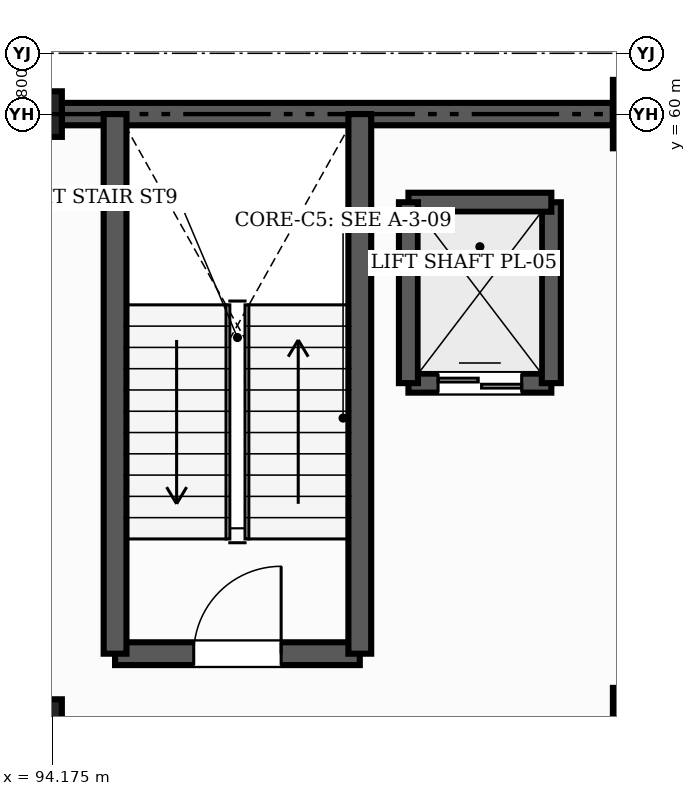
"""IFC4 building model, lengths in metres.
Left out: names, types, materials, properties, quantities, classifications, styles, units other than length and angle.
Written with IfcOpenShell. Run it as: python <this file> out.ifc"""

import sys

from ifc_helpers import new_model, si_unit, direction, frame, frame_2d, origin, origin_2d, place, context, subcontext, project, spatial, rectangle, extrude, element, fill, save


model = new_model("IFC4")
c1 = context("Model", 3, precision=1e-05, world=origin(), true_north=direction((0.0, 1.0)))
c2 = subcontext(c1, "Body", "Model", "MODEL_VIEW")
j1 = project(units=[si_unit("LENGTHUNIT", "METRE"), si_unit("PLANEANGLEUNIT", "RADIAN")], contexts=[c1])
p1 = place(None, origin())
s1 = spatial("IfcSite", under=j1, at=p1, CompositionType="ELEMENT")
p2 = place(p1, origin())
s2 = spatial("IfcBuilding", under=s1, at=p2, CompositionType="ELEMENT")
p3 = place(p2, frame((0.0, 0.0, 4.8)))
s3 = spatial("IfcBuildingStorey", under=s2, at=p3, CompositionType="ELEMENT", Elevation=4.8)
for number, where, z_axis, x_axis in (
    (1, (94.0, 52.0, 0.0), (0.0, 0.0, 1.0), (1.0, 0.0, 0.0)),
    (2, (94.0, 60.0, 0.0), (0.0, 0.0, 1.0), (1.0, 0.0, 0.0)),
):
    element("IfcColumn", number, at=place(p3, frame(where, z_axis=z_axis, x_axis=x_axis)), inside=s3, PredefinedType="COLUMN", context=c2, shape_type="SweptSolid", body=[
        extrude(rectangle(XDim=0.6, YDim=0.6, at=origin_2d()), origin(), (0.0, 0.0, 1.0), 4.2),
    ])
for number, where, z_axis, x_axis in (
    (3, (102.0, 52.0, 0.0), (0.0, 0.0, 1.0), (1.0, 0.0, 0.0)),
    (4, (102.0, 60.0, 0.0), (0.0, 0.0, 1.0), (1.0, 0.0, 0.0)),
):
    element("IfcColumn", number, at=place(p3, frame(where, z_axis=z_axis, x_axis=x_axis)), inside=s3, PredefinedType="COLUMN", context=c2, shape_type="SweptSolid", body=[
        extrude(rectangle(XDim=0.9, YDim=0.9, at=origin_2d()), origin(), (0.0, 0.0, 1.0), 4.2),
    ])
p4 = place(p3, frame((101.55, 60.0, 0.0), z_axis=(0.0, 0.0, 1.0), x_axis=(-1.0, 0.0, 0.0)))
e5 = element("IfcWall", 5, at=p4, inside=s3, PredefinedType="SOLIDWALL", context=c2, shape_type="SweptSolid", body=[
    extrude(rectangle(XDim=7.25, YDim=0.295, at=frame_2d((3.625, 0.0))), origin(), (0.0, 0.0, 1.0), 3.91),
])
p5 = place(p3, frame((95.0, 52.9, 0.0), z_axis=(0.0, 0.0, 1.0), x_axis=(1.0, 0.0, 0.0)))
e6 = element("IfcWall", 6, at=p5, inside=s3, PredefinedType="SHEAR", context=c2, shape_type="SweptSolid", body=[
    extrude(rectangle(XDim=3.22, YDim=0.3, at=frame_2d((1.61, 0.0))), origin(), (0.0, 0.0, 1.0), 4.2),
])
p6 = place(p5, frame((1.035, 0.0, 0.0)))
e7 = element("IfcOpeningElement", 7, at=p6, cuts=e6, PredefinedType="OPENING", context=c2, shape_type="SweptSolid", body=[
    extrude(rectangle(XDim=1.15, YDim=2.15, at=frame_2d((0.575, 1.075))), frame((0.0, 0.16, 0.0), z_axis=(0.0, -1.0, 0.0), x_axis=(1.0, 0.0, 0.0)), (0.0, 0.0, 1.0), 0.32),
])
for number, where, z_axis, x_axis in (
    (8, (98.22, 52.9, 0.0), (0.0, 0.0, 1.0), (0.0, 1.0, 0.0)),
    (9, (95.0, 60.0, 0.0), (0.0, 0.0, 1.0), (0.0, -1.0, 0.0)),
):
    element("IfcWall", number, at=place(p3, frame(where, z_axis=z_axis, x_axis=x_axis)), inside=s3, PredefinedType="SHEAR", context=c2, shape_type="SweptSolid", body=[
        extrude(rectangle(XDim=7.1, YDim=0.3, at=frame_2d((3.55, 0.0))), origin(), (0.0, 0.0, 1.0), 4.2),
    ])
p7 = place(p3, frame((98.86, 56.46, 0.0), z_axis=(0.0, 0.0, 1.0), x_axis=(1.0, 0.0, 0.0)))
e10 = element("IfcWall", 10, at=p7, inside=s3, PredefinedType="SHEAR", context=c2, shape_type="SweptSolid", body=[
    extrude(rectangle(XDim=1.88, YDim=0.25, at=frame_2d((0.94, 0.0))), origin(), (0.0, 0.0, 1.0), 4.2),
])
p8 = place(p7, frame((0.39, 0.0, 0.0)))
e11 = element("IfcOpeningElement", 11, at=p8, cuts=e10, PredefinedType="OPENING", context=c2, shape_type="SweptSolid", body=[
    extrude(rectangle(XDim=1.1, YDim=2.2, at=frame_2d((0.55, 1.1))), frame((0.0, 0.135, 0.0), z_axis=(0.0, -1.0, 0.0), x_axis=(1.0, 0.0, 0.0)), (0.0, 0.0, 1.0), 0.27),
])
p9 = place(p3, frame((100.74, 56.46, 0.0), z_axis=(0.0, 0.0, 1.0), x_axis=(0.0, 1.0, 0.0)))
e12 = element("IfcWall", 12, at=p9, inside=s3, PredefinedType="SHEAR", context=c2, shape_type="SweptSolid", body=[
    extrude(rectangle(XDim=2.38, YDim=0.25, at=frame_2d((1.19, 0.0))), origin(), (0.0, 0.0, 1.0), 4.2),
])
p10 = place(p3, frame((100.74, 58.84, 0.0), z_axis=(0.0, 0.0, 1.0), x_axis=(-1.0, 0.0, 0.0)))
e13 = element("IfcWall", 13, at=p10, inside=s3, PredefinedType="SHEAR", context=c2, shape_type="SweptSolid", body=[
    extrude(rectangle(XDim=1.88, YDim=0.25, at=frame_2d((0.94, 0.0))), origin(), (0.0, 0.0, 1.0), 4.2),
])
p11 = place(p3, frame((98.86, 58.84, 0.0), z_axis=(0.0, 0.0, 1.0), x_axis=(0.0, -1.0, 0.0)))
e14 = element("IfcWall", 14, at=p11, inside=s3, PredefinedType="SHEAR", context=c2, shape_type="SweptSolid", body=[
    extrude(rectangle(XDim=2.38, YDim=0.25, at=frame_2d((1.19, 0.0))), origin(), (0.0, 0.0, 1.0), 4.2),
])
p12 = place(p6, origin())
e15 = element("IfcDoor", 15, at=p12, inside=s3, OperationType="SINGLE_SWING_RIGHT", PredefinedType="DOOR", context=c2, shape_type="SweptSolid", body=[
    extrude(rectangle(XDim=1.15, YDim=2.15, at=frame_2d((0.575, 1.075))), frame((0.0, 0.025, 0.0), z_axis=(0.0, -1.0, 0.0), x_axis=(1.0, 0.0, 0.0)), (0.0, 0.0, 1.0), 0.05),
])
fill(e7, e15)
p13 = place(p8, origin())
e16 = element("IfcDoor", 16, at=p13, inside=s3, OperationType="DOUBLE_DOOR_SLIDING", PredefinedType="DOOR", context=c2, shape_type="SweptSolid", body=[
    extrude(rectangle(XDim=1.1, YDim=2.2, at=frame_2d((0.55, 1.1))), frame((0.0, 0.025, 0.0), z_axis=(0.0, -1.0, 0.0), x_axis=(1.0, 0.0, 0.0)), (0.0, 0.0, 1.0), 0.05),
])
fill(e11, e16)
save(model, sys.argv[1])
